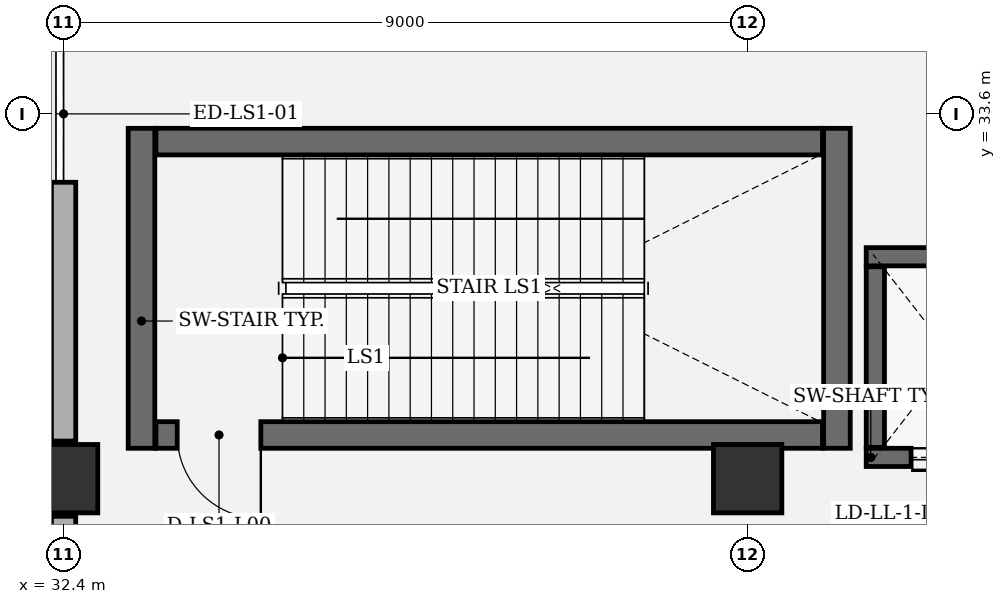
"""IFC4 building model, lengths in metres.
Left out: names, types, materials, properties, quantities, classifications, styles, units other than length and angle.
Written with IfcOpenShell. Run it as: python <this file> out.ifc"""

import sys

from ifc_helpers import new_model, si_unit, direction, frame, frame_2d, origin, origin_2d, place, context, subcontext, project, spatial, rectangle, extrude, element, fill, save


model = new_model("IFC4")
c1 = context("Model", 3, precision=1e-05, world=origin(), true_north=direction((0.0, 1.0)))
c2 = subcontext(c1, "Body", "Model", "MODEL_VIEW")
j1 = project(units=[si_unit("LENGTHUNIT", "METRE"), si_unit("PLANEANGLEUNIT", "RADIAN")], contexts=[c1])
p1 = place(None, origin())
s1 = spatial("IfcSite", under=j1, at=p1, CompositionType="ELEMENT")
p2 = place(p1, origin())
s2 = spatial("IfcBuilding", under=s1, at=p2, CompositionType="ELEMENT")
p3 = place(p2, origin())
s3 = spatial("IfcBuildingStorey", under=s2, at=p3, CompositionType="ELEMENT", Elevation=0.0)
for number, where, z_axis, x_axis in (
    (1, (32.4, 28.8, 0.0), (0.0, 0.0, 1.0), (1.0, 0.0, 0.0)),
    (2, (41.4, 28.8, 0.0), (0.0, 0.0, 1.0), (1.0, 0.0, 0.0)),
):
    element("IfcColumn", number, at=place(p3, frame(where, z_axis=z_axis, x_axis=x_axis)), inside=s3, PredefinedType="COLUMN", context=c2, shape_type="SweptSolid", body=[
        extrude(rectangle(XDim=0.9, YDim=0.9, at=origin_2d()), origin(), (0.0, 0.0, 1.0), 6.6),
    ])
p4 = place(p3, frame((32.4, 19.695, 0.0), z_axis=(0.0, 0.0, 1.0), x_axis=(0.0, 1.0, 0.0)))
e3 = element("IfcWall", 3, at=p4, inside=s3, PredefinedType="SOLIDWALL", context=c2, shape_type="SweptSolid", body=[
    extrude(rectangle(XDim=8.61, YDim=0.32, at=frame_2d((4.305, 0.0))), origin(), (0.0, 0.0, 1.0), 5.537),
])
p5 = place(p3, frame((32.4, 29.295, 0.0), z_axis=(0.0, 0.0, 1.0), x_axis=(0.0, 1.0, 0.0)))
e4 = element("IfcWall", 4, at=p5, inside=s3, PredefinedType="SOLIDWALL", context=c2, shape_type="SweptSolid", body=[
    extrude(rectangle(XDim=8.61, YDim=0.32, at=frame_2d((4.305, 0.0))), origin(), (0.0, 0.0, 1.0), 5.537),
])
p6 = place(p5, frame((3.405, 0.0, 0.0)))
e5 = element("IfcOpeningElement", 5, at=p6, cuts=e4, PredefinedType="OPENING", context=c2, shape_type="SweptSolid", body=[
    extrude(rectangle(XDim=1.8, YDim=2.35, at=frame_2d((0.9, 1.175))), frame((0.0, 0.17, 0.0), z_axis=(0.0, -1.0, 0.0), x_axis=(1.0, 0.0, 0.0)), (0.0, 0.0, 1.0), 0.34),
])
for number, where, z_axis, x_axis in (
    (6, (33.425, 33.41, 0.0), (0.0, 0.0, 1.0), (0.0, -1.0, 0.0)),
    (7, (42.575, 29.2, 0.0), (0.0, 0.0, 1.0), (0.0, 1.0, 0.0)),
):
    element("IfcWall", number, at=place(p3, frame(where, z_axis=z_axis, x_axis=x_axis)), inside=s3, PredefinedType="SHEAR", context=c2, shape_type="SweptSolid", body=[
        extrude(rectangle(XDim=4.21, YDim=0.35, at=frame_2d((2.105, 0.0))), origin(), (0.0, 0.0, 1.0), 6.595),
    ])
p7 = place(p3, frame((42.385, 29.375, 0.0), z_axis=(0.0, 0.0, 1.0), x_axis=(-1.0, 0.0, 0.0)))
e8 = element("IfcWall", 8, at=p7, inside=s3, PredefinedType="SHEAR", context=c2, shape_type="SweptSolid", body=[
    extrude(rectangle(XDim=8.77, YDim=0.35, at=frame_2d((4.385, 0.0))), origin(), (0.0, 0.0, 1.0), 6.595),
])
p8 = place(p7, frame((7.39, 0.0, 0.0)))
e9 = element("IfcOpeningElement", 9, at=p8, cuts=e8, PredefinedType="OPENING", context=c2, shape_type="SweptSolid", body=[
    extrude(rectangle(XDim=1.1, YDim=2.2, at=frame_2d((0.55, 1.1))), frame((0.0, 0.185, 0.0), z_axis=(0.0, -1.0, 0.0), x_axis=(1.0, 0.0, 0.0)), (0.0, 0.0, 1.0), 0.37),
])
p9 = place(p3, frame((42.385, 33.235, 0.0), z_axis=(0.0, 0.0, 1.0), x_axis=(-1.0, 0.0, 0.0)))
e10 = element("IfcWall", 10, at=p9, inside=s3, PredefinedType="SHEAR", context=c2, shape_type="SweptSolid", body=[
    extrude(rectangle(XDim=8.77, YDim=0.35, at=frame_2d((4.385, 0.0))), origin(), (0.0, 0.0, 1.0), 6.595),
])
p10 = place(p3, frame((45.24, 29.08, 0.0), z_axis=(0.0, 0.0, 1.0), x_axis=(-1.0, 0.0, 0.0)))
e11 = element("IfcWall", 11, at=p10, inside=s3, PredefinedType="SHEAR", context=c2, shape_type="SweptSolid", body=[
    extrude(rectangle(XDim=2.28, YDim=0.24, at=frame_2d((1.14, 0.0))), origin(), (0.0, 0.0, 1.0), 6.34),
])
p11 = place(p10, frame((0.59, 0.0, 0.0)))
e12 = element("IfcOpeningElement", 12, at=p11, cuts=e11, PredefinedType="OPENING", context=c2, shape_type="SweptSolid", body=[
    extrude(rectangle(XDim=1.1, YDim=2.2, at=frame_2d((0.55, 1.1))), frame((0.0, 0.13, 0.0), z_axis=(0.0, -1.0, 0.0), x_axis=(1.0, 0.0, 0.0)), (0.0, 0.0, 1.0), 0.26),
])
p12 = place(p3, frame((42.96, 31.72, 0.0), z_axis=(0.0, 0.0, 1.0), x_axis=(1.0, 0.0, 0.0)))
e13 = element("IfcWall", 13, at=p12, inside=s3, PredefinedType="SHEAR", context=c2, shape_type="SweptSolid", body=[
    extrude(rectangle(XDim=2.28, YDim=0.24, at=frame_2d((1.14, 0.0))), origin(), (0.0, 0.0, 1.0), 6.34),
])
p13 = place(p3, frame((43.08, 29.212, 0.0), z_axis=(0.0, 0.0, 1.0), x_axis=(0.0, 1.0, 0.0)))
e14 = element("IfcWall", 14, at=p13, inside=s3, PredefinedType="SHEAR", context=c2, shape_type="SweptSolid", body=[
    extrude(rectangle(XDim=2.376, YDim=0.24, at=frame_2d((1.188, 0.0))), origin(), (0.0, 0.0, 1.0), 6.34),
])
p14 = place(p6, origin())
e15 = element("IfcDoor", 15, at=p14, inside=s3, OperationType="SINGLE_SWING_RIGHT", PredefinedType="DOOR", context=c2, shape_type="SweptSolid", body=[
    extrude(rectangle(XDim=1.8, YDim=2.35, at=frame_2d((0.9, 1.175))), frame((0.0, 0.025, 0.0), z_axis=(0.0, -1.0, 0.0), x_axis=(1.0, 0.0, 0.0)), (0.0, 0.0, 1.0), 0.05),
])
fill(e5, e15)
p15 = place(p8, origin())
e16 = element("IfcDoor", 16, at=p15, inside=s3, OperationType="SINGLE_SWING_LEFT", PredefinedType="DOOR", context=c2, shape_type="SweptSolid", body=[
    extrude(rectangle(XDim=1.1, YDim=2.2, at=frame_2d((0.55, 1.1))), frame((0.0, 0.025, 0.0), z_axis=(0.0, -1.0, 0.0), x_axis=(1.0, 0.0, 0.0)), (0.0, 0.0, 1.0), 0.05),
])
fill(e9, e16)
p16 = place(p11, origin())
e17 = element("IfcDoor", 17, at=p16, inside=s3, OperationType="DOUBLE_DOOR_SLIDING", PredefinedType="DOOR", context=c2, shape_type="SweptSolid", body=[
    extrude(rectangle(XDim=1.1, YDim=2.2, at=frame_2d((0.55, 1.1))), frame((0.0, 0.025, 0.0), z_axis=(0.0, -1.0, 0.0), x_axis=(1.0, 0.0, 0.0)), (0.0, 0.0, 1.0), 0.05),
])
fill(e12, e17)
save(model, sys.argv[1])
